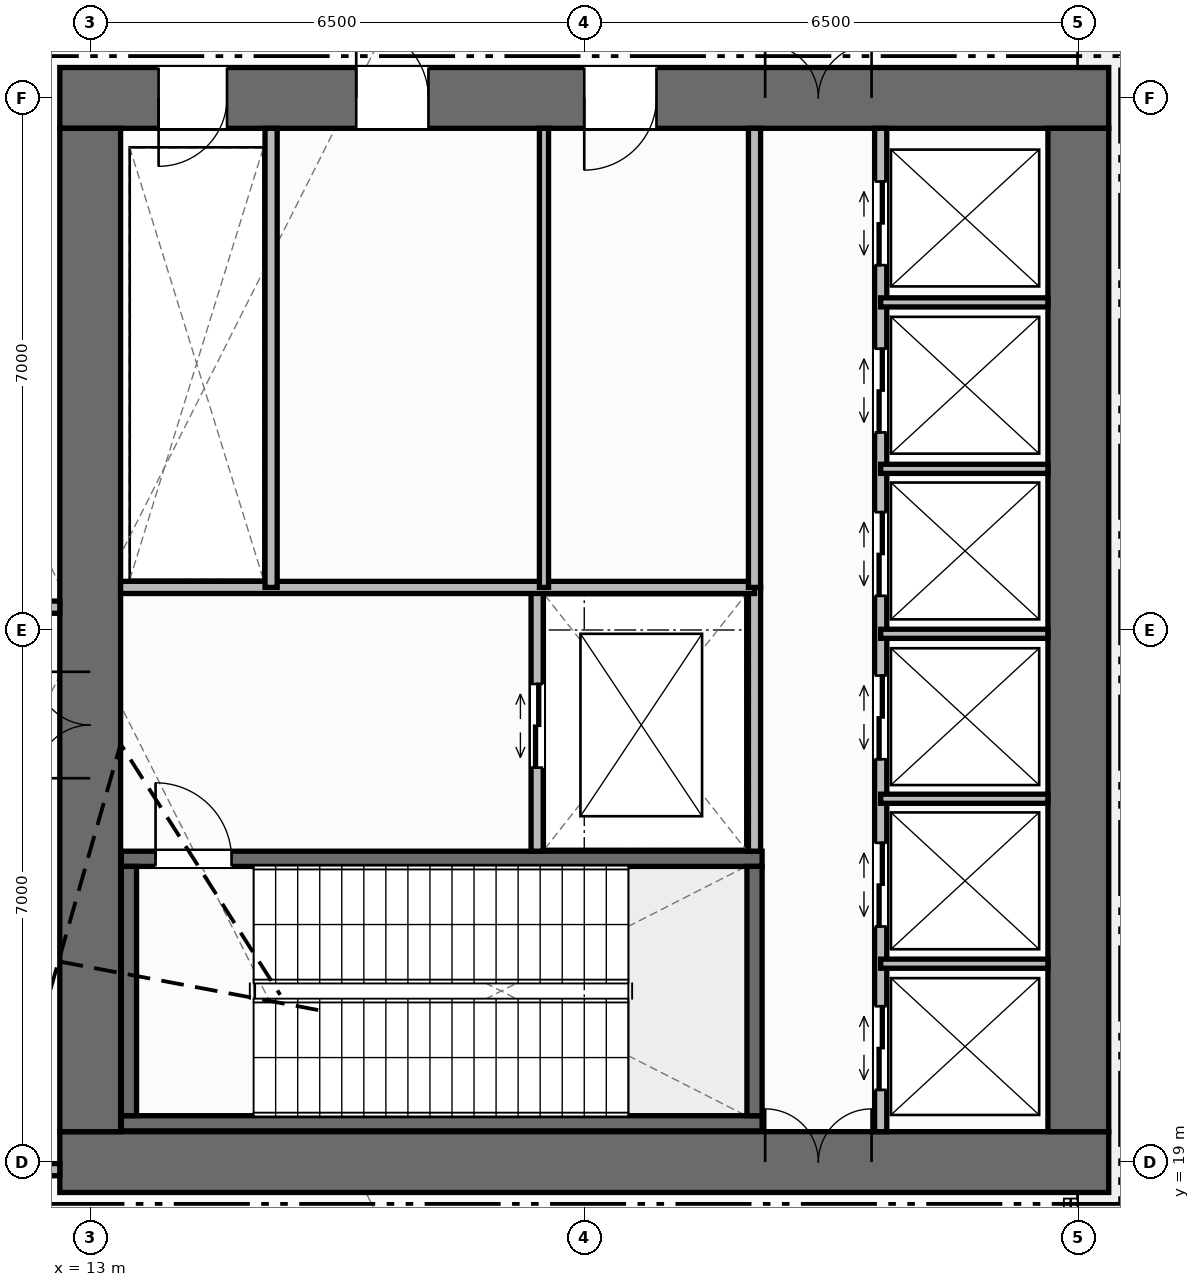
"""IFC4 building model, lengths in metres.
Left out: names, types, materials, properties, quantities, classifications, styles, units other than length and angle.
Written with IfcOpenShell. Run it as: python <this file> out.ifc"""

import sys

from ifc_helpers import new_model, si_unit, direction, frame, frame_2d, origin, place, context, subcontext, project, spatial, rectangle, extrude, element, fill, save


model = new_model("IFC4")
c1 = context("Model", 3, precision=1e-05, world=origin(), true_north=direction((0.0, 1.0)))
c2 = subcontext(c1, "Body", "Model", "MODEL_VIEW")
j1 = project(units=[si_unit("LENGTHUNIT", "METRE"), si_unit("PLANEANGLEUNIT", "RADIAN")], contexts=[c1])
p1 = place(None, origin())
s1 = spatial("IfcSite", under=j1, at=p1, CompositionType="ELEMENT")
p2 = place(p1, origin())
s2 = spatial("IfcBuilding", under=s1, at=p2, CompositionType="ELEMENT")
p3 = place(p2, origin())
s3 = spatial("IfcBuildingStorey", under=s2, at=p3, CompositionType="ELEMENT", Elevation=0.0)
p4 = place(p3, frame((12.6, 19.0, 0.0), z_axis=(0.0, 0.0, 1.0), x_axis=(1.0, 0.0, 0.0)))
e1 = element("IfcWall", 1, at=p4, inside=s3, PredefinedType="SHEAR", context=c2, shape_type="SweptSolid", body=[
    extrude(rectangle(XDim=13.8, YDim=0.8, at=frame_2d((6.9, 0.0))), origin(), (0.0, 0.0, 1.0), 6.0),
])
p5 = place(p4, frame((9.28, 0.0, 0.0)))
e2 = element("IfcOpeningElement", 2, at=p5, cuts=e1, PredefinedType="OPENING", context=c2, shape_type="SweptSolid", body=[
    extrude(rectangle(XDim=1.4, YDim=2.2, at=frame_2d((0.7, 1.1))), frame((0.0, 0.41, 0.0), z_axis=(0.0, -1.0, 0.0), x_axis=(1.0, 0.0, 0.0)), (0.0, 0.0, 1.0), 0.82),
])
p6 = place(p3, frame((12.6, 33.0, 0.0), z_axis=(0.0, 0.0, 1.0), x_axis=(1.0, 0.0, 0.0)))
e3 = element("IfcWall", 3, at=p6, inside=s3, PredefinedType="SHEAR", context=c2, shape_type="SweptSolid", body=[
    extrude(rectangle(XDim=13.8, YDim=0.8, at=frame_2d((6.9, 0.0))), origin(), (0.0, 0.0, 1.0), 6.0),
])
p7 = place(p6, frame((1.3, 0.0, 0.0)))
e4 = element("IfcOpeningElement", 4, at=p7, cuts=e3, PredefinedType="OPENING", context=c2, shape_type="SweptSolid", body=[
    extrude(rectangle(XDim=0.9, YDim=2.15, at=frame_2d((0.45, 1.075))), frame((0.0, 0.41, 0.0), z_axis=(0.0, -1.0, 0.0), x_axis=(1.0, 0.0, 0.0)), (0.0, 0.0, 1.0), 0.82),
])
p8 = place(p6, frame((3.9, 0.0, 0.0)))
e5 = element("IfcOpeningElement", 5, at=p8, cuts=e3, PredefinedType="OPENING", context=c2, shape_type="SweptSolid", body=[
    extrude(rectangle(XDim=0.95, YDim=2.15, at=frame_2d((0.475, 1.075))), frame((0.0, 0.41, 0.0), z_axis=(0.0, -1.0, 0.0), x_axis=(1.0, 0.0, 0.0)), (0.0, 0.0, 1.0), 0.82),
])
p9 = place(p6, frame((6.9, 0.0, 0.0)))
e6 = element("IfcOpeningElement", 6, at=p9, cuts=e3, PredefinedType="OPENING", context=c2, shape_type="SweptSolid", body=[
    extrude(rectangle(XDim=0.95, YDim=2.15, at=frame_2d((0.475, 1.075))), frame((0.0, 0.41, 0.0), z_axis=(0.0, -1.0, 0.0), x_axis=(1.0, 0.0, 0.0)), (0.0, 0.0, 1.0), 0.82),
])
p10 = place(p6, frame((9.28, 0.0, 0.0)))
e7 = element("IfcOpeningElement", 7, at=p10, cuts=e3, PredefinedType="OPENING", context=c2, shape_type="SweptSolid", body=[
    extrude(rectangle(XDim=1.4, YDim=2.2, at=frame_2d((0.7, 1.1))), frame((0.0, 0.41, 0.0), z_axis=(0.0, -1.0, 0.0), x_axis=(1.0, 0.0, 0.0)), (0.0, 0.0, 1.0), 0.82),
])
p11 = place(p3, frame((13.0, 19.4, 0.0), z_axis=(0.0, 0.0, 1.0), x_axis=(0.0, 1.0, 0.0)))
e8 = element("IfcWall", 8, at=p11, inside=s3, PredefinedType="SHEAR", context=c2, shape_type="SweptSolid", body=[
    extrude(rectangle(XDim=13.2, YDim=0.8, at=frame_2d((6.6, 0.0))), origin(), (0.0, 0.0, 1.0), 6.0),
])
p12 = place(p11, frame((4.65, 0.0, 0.0)))
e9 = element("IfcOpeningElement", 9, at=p12, cuts=e8, PredefinedType="OPENING", context=c2, shape_type="SweptSolid", body=[
    extrude(rectangle(XDim=1.4, YDim=2.2, at=frame_2d((0.7, 1.1))), frame((0.0, 0.41, 0.0), z_axis=(0.0, -1.0, 0.0), x_axis=(1.0, 0.0, 0.0)), (0.0, 0.0, 1.0), 0.82),
])
p13 = place(p3, frame((26.0, 19.4, 0.0), z_axis=(0.0, 0.0, 1.0), x_axis=(0.0, 1.0, 0.0)))
e10 = element("IfcWall", 10, at=p13, inside=s3, PredefinedType="SHEAR", context=c2, shape_type="SweptSolid", body=[
    extrude(rectangle(XDim=13.2, YDim=0.8, at=frame_2d((6.6, 0.0))), origin(), (0.0, 0.0, 1.0), 6.0),
])
p14 = place(p3, frame((13.41, 19.51, 0.0), z_axis=(0.0, 0.0, 1.0), x_axis=(1.0, 0.0, 0.0)))
e11 = element("IfcWall", 11, at=p14, inside=s3, PredefinedType="SHEAR", context=c2, shape_type="SweptSolid", body=[
    extrude(rectangle(XDim=8.43, YDim=0.2, at=frame_2d((4.215, 0.0))), origin(), (0.0, 0.0, 1.0), 6.0),
])
p15 = place(p3, frame((13.41, 22.99, 0.0), z_axis=(0.0, 0.0, 1.0), x_axis=(1.0, 0.0, 0.0)))
e12 = element("IfcWall", 12, at=p15, inside=s3, PredefinedType="SHEAR", context=c2, shape_type="SweptSolid", body=[
    extrude(rectangle(XDim=8.43, YDim=0.2, at=frame_2d((4.215, 0.0))), origin(), (0.0, 0.0, 1.0), 6.0),
])
p16 = place(p15, frame((0.45, 0.0, 0.0)))
e13 = element("IfcOpeningElement", 13, at=p16, cuts=e12, PredefinedType="OPENING", context=c2, shape_type="SweptSolid", body=[
    extrude(rectangle(XDim=1.0, YDim=2.15, at=frame_2d((0.5, 1.075))), frame((0.0, 0.11, 0.0), z_axis=(0.0, -1.0, 0.0), x_axis=(1.0, 0.0, 0.0)), (0.0, 0.0, 1.0), 0.22),
])
for number, where, z_axis, x_axis in (
    (14, (13.51, 19.61, 0.0), (0.0, 0.0, 1.0), (0.0, 1.0, 0.0)),
    (15, (21.74, 19.61, 0.0), (0.0, 0.0, 1.0), (0.0, 1.0, 0.0)),
):
    element("IfcWall", number, at=place(p3, frame(where, z_axis=z_axis, x_axis=x_axis)), inside=s3, PredefinedType="SHEAR", context=c2, shape_type="SweptSolid", body=[
        extrude(rectangle(XDim=3.28, YDim=0.2, at=frame_2d((1.64, 0.0))), origin(), (0.0, 0.0, 1.0), 6.0),
    ])
p17 = place(p3, frame((21.74, 23.09, 0.0), z_axis=(0.0, 0.0, 1.0), x_axis=(0.0, 1.0, 0.0)))
e16 = element("IfcWall", 16, at=p17, inside=s3, PredefinedType="STANDARD", context=c2, shape_type="SweptSolid", body=[
    extrude(rectangle(XDim=3.47, YDim=0.16, at=frame_2d((1.735, 0.0))), origin(), (0.0, 0.0, 1.0), 5.72),
])
p18 = place(p3, frame((18.88, 23.09, 0.0), z_axis=(0.0, 0.0, 1.0), x_axis=(0.0, 1.0, 0.0)))
e17 = element("IfcWall", 17, at=p18, inside=s3, PredefinedType="STANDARD", context=c2, shape_type="SweptSolid", body=[
    extrude(rectangle(XDim=3.47, YDim=0.16, at=frame_2d((1.735, 0.0))), origin(), (0.0, 0.0, 1.0), 5.72),
])
p19 = place(p18, frame((1.1, 0.0, 0.0)))
e18 = element("IfcOpeningElement", 18, at=p19, cuts=e17, PredefinedType="OPENING", context=c2, shape_type="SweptSolid", body=[
    extrude(rectangle(XDim=1.1, YDim=2.2, at=frame_2d((0.55, 1.1))), frame((0.0, 0.09, 0.0), z_axis=(0.0, -1.0, 0.0), x_axis=(1.0, 0.0, 0.0)), (0.0, 0.0, 1.0), 0.18),
])
p20 = place(p3, frame((13.4, 26.56, 0.0), z_axis=(0.0, 0.0, 1.0), x_axis=(1.0, 0.0, 0.0)))
e19 = element("IfcWall", 19, at=p20, inside=s3, PredefinedType="STANDARD", context=c2, shape_type="SweptSolid", body=[
    extrude(rectangle(XDim=8.34, YDim=0.16, at=frame_2d((4.17, 0.0))), origin(), (0.0, 0.0, 1.0), 5.72),
])
p21 = place(p3, frame((15.38, 26.56, 0.0), z_axis=(0.0, 0.0, 1.0), x_axis=(0.0, 1.0, 0.0)))
e20 = element("IfcWall", 20, at=p21, inside=s3, PredefinedType="STANDARD", context=c2, shape_type="SweptSolid", body=[
    extrude(rectangle(XDim=6.04, YDim=0.16, at=frame_2d((3.02, 0.0))), origin(), (0.0, 0.0, 1.0), 5.72),
])
p22 = place(p3, frame((18.97, 26.56, 0.0), z_axis=(0.0, 0.0, 1.0), x_axis=(0.0, 1.0, 0.0)))
e21 = element("IfcWall", 21, at=p22, inside=s3, PredefinedType="PARTITIONING", context=c2, shape_type="SweptSolid", body=[
    extrude(rectangle(XDim=6.04, YDim=0.12, at=frame_2d((3.02, 0.0))), origin(), (0.0, 0.0, 1.0), 5.72),
])
p23 = place(p3, frame((21.74, 26.56, 0.0), z_axis=(0.0, 0.0, 1.0), x_axis=(0.0, 1.0, 0.0)))
e22 = element("IfcWall", 22, at=p23, inside=s3, PredefinedType="STANDARD", context=c2, shape_type="SweptSolid", body=[
    extrude(rectangle(XDim=6.04, YDim=0.16, at=frame_2d((3.02, 0.0))), origin(), (0.0, 0.0, 1.0), 5.72),
])
p24 = place(p3, frame((23.4, 19.4, 0.0), z_axis=(0.0, 0.0, 1.0), x_axis=(0.0, 1.0, 0.0)))
e23 = element("IfcWall", 23, at=p24, inside=s3, PredefinedType="STANDARD", context=c2, shape_type="SweptSolid", body=[
    extrude(rectangle(XDim=13.2, YDim=0.16, at=frame_2d((6.6, 0.0))), origin(), (0.0, 0.0, 1.0), 5.72),
])
p25 = place(p24, frame((0.55, 0.0, 0.0)))
e24 = element("IfcOpeningElement", 24, at=p25, cuts=e23, PredefinedType="OPENING", context=c2, shape_type="SweptSolid", body=[
    extrude(rectangle(XDim=1.1, YDim=2.2, at=frame_2d((0.55, 1.1))), frame((0.0, 0.09, 0.0), z_axis=(0.0, -1.0, 0.0), x_axis=(1.0, 0.0, 0.0)), (0.0, 0.0, 1.0), 0.18),
])
p26 = place(p24, frame((2.7, 0.0, 0.0)))
e25 = element("IfcOpeningElement", 25, at=p26, cuts=e23, PredefinedType="OPENING", context=c2, shape_type="SweptSolid", body=[
    extrude(rectangle(XDim=1.1, YDim=2.2, at=frame_2d((0.55, 1.1))), frame((0.0, 0.09, 0.0), z_axis=(0.0, -1.0, 0.0), x_axis=(1.0, 0.0, 0.0)), (0.0, 0.0, 1.0), 0.18),
])
p27 = place(p24, frame((4.9, 0.0, 0.0)))
e26 = element("IfcOpeningElement", 26, at=p27, cuts=e23, PredefinedType="OPENING", context=c2, shape_type="SweptSolid", body=[
    extrude(rectangle(XDim=1.1, YDim=2.2, at=frame_2d((0.55, 1.1))), frame((0.0, 0.09, 0.0), z_axis=(0.0, -1.0, 0.0), x_axis=(1.0, 0.0, 0.0)), (0.0, 0.0, 1.0), 0.18),
])
p28 = place(p24, frame((7.05, 0.0, 0.0)))
e27 = element("IfcOpeningElement", 27, at=p28, cuts=e23, PredefinedType="OPENING", context=c2, shape_type="SweptSolid", body=[
    extrude(rectangle(XDim=1.1, YDim=2.2, at=frame_2d((0.55, 1.1))), frame((0.0, 0.09, 0.0), z_axis=(0.0, -1.0, 0.0), x_axis=(1.0, 0.0, 0.0)), (0.0, 0.0, 1.0), 0.18),
])
p29 = place(p24, frame((9.2, 0.0, 0.0)))
e28 = element("IfcOpeningElement", 28, at=p29, cuts=e23, PredefinedType="OPENING", context=c2, shape_type="SweptSolid", body=[
    extrude(rectangle(XDim=1.1, YDim=2.2, at=frame_2d((0.55, 1.1))), frame((0.0, 0.09, 0.0), z_axis=(0.0, -1.0, 0.0), x_axis=(1.0, 0.0, 0.0)), (0.0, 0.0, 1.0), 0.18),
])
p30 = place(p24, frame((11.4, 0.0, 0.0)))
e29 = element("IfcOpeningElement", 29, at=p30, cuts=e23, PredefinedType="OPENING", context=c2, shape_type="SweptSolid", body=[
    extrude(rectangle(XDim=1.1, YDim=2.2, at=frame_2d((0.55, 1.1))), frame((0.0, 0.09, 0.0), z_axis=(0.0, -1.0, 0.0), x_axis=(1.0, 0.0, 0.0)), (0.0, 0.0, 1.0), 0.18),
])
for number, where, z_axis, x_axis in (
    (30, (23.4, 21.61, 0.0), (0.0, 0.0, 1.0), (1.0, 0.0, 0.0)),
    (31, (23.4, 23.78, 0.0), (0.0, 0.0, 1.0), (1.0, 0.0, 0.0)),
    (32, (23.4, 25.95, 0.0), (0.0, 0.0, 1.0), (1.0, 0.0, 0.0)),
    (33, (23.4, 28.12, 0.0), (0.0, 0.0, 1.0), (1.0, 0.0, 0.0)),
    (34, (23.4, 30.31, 0.0), (0.0, 0.0, 1.0), (1.0, 0.0, 0.0)),
):
    element("IfcWall", number, at=place(p3, frame(where, z_axis=z_axis, x_axis=x_axis)), inside=s3, PredefinedType="PARTITIONING", context=c2, shape_type="SweptSolid", body=[
        extrude(rectangle(XDim=2.2, YDim=0.12, at=frame_2d((1.1, 0.0))), origin(), (0.0, 0.0, 1.0), 5.72),
    ])
p31 = place(p3, frame((0.1, 18.9, 0.0), z_axis=(0.0, 0.0, 1.0), x_axis=(1.0, 0.0, 0.0)))
e35 = element("IfcWall", 35, at=p31, inside=s3, PredefinedType="STANDARD", context=c2, shape_type="SweptSolid", body=[
    extrude(rectangle(XDim=12.5, YDim=0.16, at=frame_2d((6.25, 0.0))), origin(), (0.0, 0.0, 1.0), 4.92),
])
p32 = place(p31, frame((8.2, 0.0, 0.0)))
e36 = element("IfcOpeningElement", 36, at=p32, cuts=e35, PredefinedType="OPENING", context=c2, shape_type="SweptSolid", body=[
    extrude(rectangle(XDim=1.4, YDim=2.2, at=frame_2d((0.7, 1.1))), frame((0.0, 0.09, 0.0), z_axis=(0.0, -1.0, 0.0), x_axis=(1.0, 0.0, 0.0)), (0.0, 0.0, 1.0), 0.18),
])
p33 = place(p3, frame((0.1, 26.3, 0.0), z_axis=(0.0, 0.0, 1.0), x_axis=(1.0, 0.0, 0.0)))
e37 = element("IfcWall", 37, at=p33, inside=s3, PredefinedType="STANDARD", context=c2, shape_type="SweptSolid", body=[
    extrude(rectangle(XDim=12.5, YDim=0.16, at=frame_2d((6.25, 0.0))), origin(), (0.0, 0.0, 1.0), 5.72),
])
p34 = place(p33, frame((9.6, 0.0, 0.0)))
e38 = element("IfcOpeningElement", 38, at=p34, cuts=e37, PredefinedType="OPENING", context=c2, shape_type="SweptSolid", body=[
    extrude(rectangle(XDim=1.4, YDim=2.2, at=frame_2d((0.7, 1.1))), frame((0.0, 0.09, 0.0), z_axis=(0.0, -1.0, 0.0), x_axis=(1.0, 0.0, 0.0)), (0.0, 0.0, 1.0), 0.18),
])
p35 = place(p16, origin())
e39 = element("IfcDoor", 39, at=p35, inside=s3, OperationType="SINGLE_SWING_LEFT", PredefinedType="DOOR", context=c2, shape_type="SweptSolid", body=[
    extrude(rectangle(XDim=1.0, YDim=2.15, at=frame_2d((0.5, 1.075))), frame((0.0, 0.025, 0.0), z_axis=(0.0, -1.0, 0.0), x_axis=(1.0, 0.0, 0.0)), (0.0, 0.0, 1.0), 0.05),
])
fill(e13, e39)
p36 = place(p12, origin())
e40 = element("IfcDoor", 40, at=p36, inside=s3, OperationType="DOUBLE_DOOR_SINGLE_SWING", PredefinedType="DOOR", context=c2, shape_type="SweptSolid", body=[
    extrude(rectangle(XDim=1.4, YDim=2.2, at=frame_2d((0.7, 1.1))), frame((0.0, 0.025, 0.0), z_axis=(0.0, -1.0, 0.0), x_axis=(1.0, 0.0, 0.0)), (0.0, 0.0, 1.0), 0.05),
])
fill(e9, e40)
p37 = place(p19, origin())
e41 = element("IfcDoor", 41, at=p37, inside=s3, OperationType="DOUBLE_DOOR_SLIDING", PredefinedType="DOOR", context=c2, shape_type="SweptSolid", body=[
    extrude(rectangle(XDim=1.1, YDim=2.2, at=frame_2d((0.55, 1.1))), frame((0.0, 0.025, 0.0), z_axis=(0.0, -1.0, 0.0), x_axis=(1.0, 0.0, 0.0)), (0.0, 0.0, 1.0), 0.05),
])
fill(e18, e41)
p38 = place(p7, origin())
e42 = element("IfcDoor", 42, at=p38, inside=s3, OperationType="SINGLE_SWING_RIGHT", PredefinedType="DOOR", context=c2, shape_type="SweptSolid", body=[
    extrude(rectangle(XDim=0.9, YDim=2.15, at=frame_2d((0.45, 1.075))), frame((0.0, -0.075, 0.0), z_axis=(0.0, -1.0, 0.0), x_axis=(1.0, 0.0, 0.0)), (0.0, 0.0, 1.0), 0.05),
])
fill(e4, e42)
p39 = place(p8, origin())
e43 = element("IfcDoor", 43, at=p39, inside=s3, OperationType="SINGLE_SWING_LEFT", PredefinedType="DOOR", context=c2, shape_type="SweptSolid", body=[
    extrude(rectangle(XDim=0.95, YDim=2.15, at=frame_2d((0.475, 1.075))), frame((0.0, -0.075, 0.0), z_axis=(0.0, -1.0, 0.0), x_axis=(1.0, 0.0, 0.0)), (0.0, 0.0, 1.0), 0.05),
])
fill(e5, e43)
p40 = place(p9, origin())
e44 = element("IfcDoor", 44, at=p40, inside=s3, OperationType="SINGLE_SWING_RIGHT", PredefinedType="DOOR", context=c2, shape_type="SweptSolid", body=[
    extrude(rectangle(XDim=0.95, YDim=2.15, at=frame_2d((0.475, 1.075))), frame((0.0, -0.075, 0.0), z_axis=(0.0, -1.0, 0.0), x_axis=(1.0, 0.0, 0.0)), (0.0, 0.0, 1.0), 0.05),
])
fill(e6, e44)
p41 = place(p5, origin())
e45 = element("IfcDoor", 45, at=p41, inside=s3, OperationType="DOUBLE_DOOR_SINGLE_SWING", PredefinedType="DOOR", context=c2, shape_type="SweptSolid", body=[
    extrude(rectangle(XDim=1.4, YDim=2.2, at=frame_2d((0.7, 1.1))), frame((0.0, 0.125, 0.0), z_axis=(0.0, -1.0, 0.0), x_axis=(1.0, 0.0, 0.0)), (0.0, 0.0, 1.0), 0.05),
])
fill(e2, e45)
p42 = place(p10, origin())
e46 = element("IfcDoor", 46, at=p42, inside=s3, OperationType="DOUBLE_DOOR_SINGLE_SWING", PredefinedType="DOOR", context=c2, shape_type="SweptSolid", body=[
    extrude(rectangle(XDim=1.4, YDim=2.2, at=frame_2d((0.7, 1.1))), frame((0.0, -0.075, 0.0), z_axis=(0.0, -1.0, 0.0), x_axis=(1.0, 0.0, 0.0)), (0.0, 0.0, 1.0), 0.05),
])
fill(e7, e46)
p43 = place(p25, origin())
e47 = element("IfcDoor", 47, at=p43, inside=s3, OperationType="DOUBLE_DOOR_SLIDING", PredefinedType="DOOR", context=c2, shape_type="SweptSolid", body=[
    extrude(rectangle(XDim=1.1, YDim=2.2, at=frame_2d((0.55, 1.1))), frame((0.0, 0.025, 0.0), z_axis=(0.0, -1.0, 0.0), x_axis=(1.0, 0.0, 0.0)), (0.0, 0.0, 1.0), 0.05),
])
fill(e24, e47)
p44 = place(p26, origin())
e48 = element("IfcDoor", 48, at=p44, inside=s3, OperationType="DOUBLE_DOOR_SLIDING", PredefinedType="DOOR", context=c2, shape_type="SweptSolid", body=[
    extrude(rectangle(XDim=1.1, YDim=2.2, at=frame_2d((0.55, 1.1))), frame((0.0, 0.025, 0.0), z_axis=(0.0, -1.0, 0.0), x_axis=(1.0, 0.0, 0.0)), (0.0, 0.0, 1.0), 0.05),
])
fill(e25, e48)
p45 = place(p27, origin())
e49 = element("IfcDoor", 49, at=p45, inside=s3, OperationType="DOUBLE_DOOR_SLIDING", PredefinedType="DOOR", context=c2, shape_type="SweptSolid", body=[
    extrude(rectangle(XDim=1.1, YDim=2.2, at=frame_2d((0.55, 1.1))), frame((0.0, 0.025, 0.0), z_axis=(0.0, -1.0, 0.0), x_axis=(1.0, 0.0, 0.0)), (0.0, 0.0, 1.0), 0.05),
])
fill(e26, e49)
p46 = place(p28, origin())
e50 = element("IfcDoor", 50, at=p46, inside=s3, OperationType="DOUBLE_DOOR_SLIDING", PredefinedType="DOOR", context=c2, shape_type="SweptSolid", body=[
    extrude(rectangle(XDim=1.1, YDim=2.2, at=frame_2d((0.55, 1.1))), frame((0.0, 0.025, 0.0), z_axis=(0.0, -1.0, 0.0), x_axis=(1.0, 0.0, 0.0)), (0.0, 0.0, 1.0), 0.05),
])
fill(e27, e50)
p47 = place(p29, origin())
e51 = element("IfcDoor", 51, at=p47, inside=s3, OperationType="DOUBLE_DOOR_SLIDING", PredefinedType="DOOR", context=c2, shape_type="SweptSolid", body=[
    extrude(rectangle(XDim=1.1, YDim=2.2, at=frame_2d((0.55, 1.1))), frame((0.0, 0.025, 0.0), z_axis=(0.0, -1.0, 0.0), x_axis=(1.0, 0.0, 0.0)), (0.0, 0.0, 1.0), 0.05),
])
fill(e28, e51)
p48 = place(p30, origin())
e52 = element("IfcDoor", 52, at=p48, inside=s3, OperationType="DOUBLE_DOOR_SLIDING", PredefinedType="DOOR", context=c2, shape_type="SweptSolid", body=[
    extrude(rectangle(XDim=1.1, YDim=2.2, at=frame_2d((0.55, 1.1))), frame((0.0, 0.025, 0.0), z_axis=(0.0, -1.0, 0.0), x_axis=(1.0, 0.0, 0.0)), (0.0, 0.0, 1.0), 0.05),
])
fill(e29, e52)
save(model, sys.argv[1])
